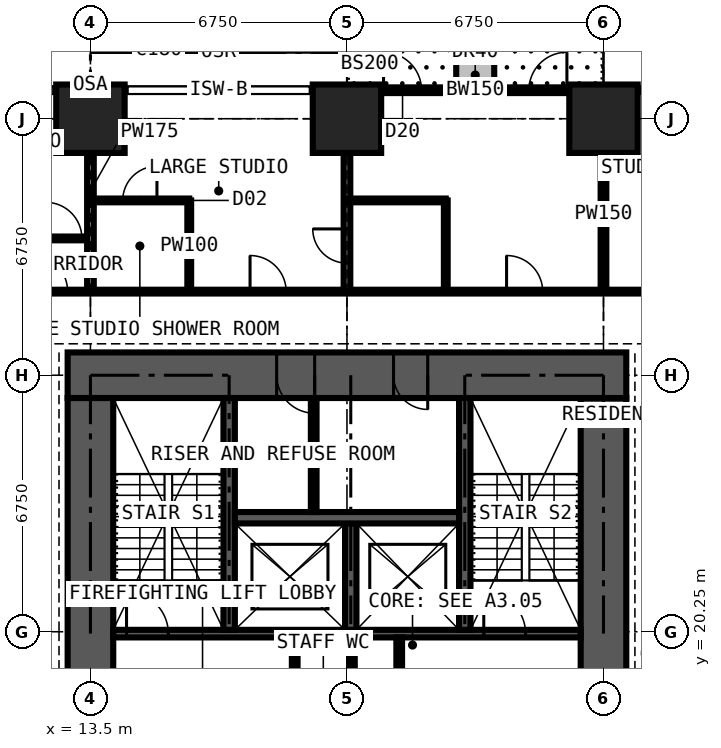
"""IFC4 building model, lengths in metres.
Left out: names, types, materials, properties, quantities, classifications, styles, units other than length and angle.
Written with IfcOpenShell. Run it as: python <this file> out.ifc"""

import sys

from ifc_helpers import new_model, si_unit, direction, frame, frame_2d, origin, origin_2d, place, context, subcontext, project, spatial, rectangle, extrude, element, fill, save


model = new_model("IFC4")
c1 = context("Model", 3, precision=1e-05, world=origin(), true_north=direction((0.0, 1.0)))
c2 = subcontext(c1, "Body", "Model", "MODEL_VIEW")
j1 = project(units=[si_unit("LENGTHUNIT", "METRE"), si_unit("PLANEANGLEUNIT", "RADIAN")], contexts=[c1])
p1 = place(None, origin())
s1 = spatial("IfcSite", under=j1, at=p1, CompositionType="ELEMENT")
p2 = place(p1, origin())
s2 = spatial("IfcBuilding", under=s1, at=p2, CompositionType="ELEMENT")
p3 = place(p2, frame((0.0, 0.0, 105.3)))
s3 = spatial("IfcBuildingStorey", under=s2, at=p3, CompositionType="ELEMENT", Elevation=105.3)
for number, where, z_axis, x_axis in (
    (1, (13.5, 33.75, 0.0), (0.0, 0.0, 1.0), (1.0, 0.0, 0.0)),
    (2, (20.25, 33.75, 0.0), (0.0, 0.0, 1.0), (1.0, 0.0, 0.0)),
    (3, (27.0, 33.75, 0.0), (0.0, 0.0, 1.0), (1.0, 0.0, 0.0)),
):
    element("IfcColumn", number, at=place(p3, frame(where, z_axis=z_axis, x_axis=x_axis)), inside=s3, PredefinedType="COLUMN", context=c2, shape_type="SweptSolid", body=[
        extrude(rectangle(XDim=1.8, YDim=1.8, at=origin_2d()), origin(), (0.0, 0.0, 1.0), 3.6),
    ])
p4 = place(p3, frame((27.0, 14.1, 0.0), z_axis=(0.0, 0.0, 1.0), x_axis=(0.0, 1.0, 0.0)))
e4 = element("IfcWall", 4, at=p4, inside=s3, PredefinedType="SHEAR", context=c2, shape_type="SweptSolid", body=[
    extrude(rectangle(XDim=12.3, YDim=1.2, at=frame_2d((6.15, 0.0))), origin(), (0.0, 0.0, 1.0), 3.6),
])
p5 = place(p4, frame((3.65, 0.0, 0.0)))
e5 = element("IfcOpeningElement", 5, at=p5, cuts=e4, PredefinedType="OPENING", context=c2, shape_type="SweptSolid", body=[
    extrude(rectangle(XDim=1.2, YDim=2.2, at=frame_2d((0.6, 1.1))), frame((0.0, 0.61, 0.0), z_axis=(0.0, -1.0, 0.0), x_axis=(1.0, 0.0, 0.0)), (0.0, 0.0, 1.0), 1.22),
])
p6 = place(p3, frame((27.6, 27.0, 0.0), z_axis=(0.0, 0.0, 1.0), x_axis=(-1.0, 0.0, 0.0)))
e6 = element("IfcWall", 6, at=p6, inside=s3, PredefinedType="SHEAR", context=c2, shape_type="SweptSolid", body=[
    extrude(rectangle(XDim=14.7, YDim=1.2, at=frame_2d((7.35, 0.0))), origin(), (0.0, 0.0, 1.0), 3.6),
])
p7 = place(p6, frame((5.225, 0.0, 0.0)))
e7 = element("IfcOpeningElement", 7, at=p7, cuts=e6, PredefinedType="OPENING", context=c2, shape_type="SweptSolid", body=[
    extrude(rectangle(XDim=0.9, YDim=2.2, at=frame_2d((0.45, 1.1))), frame((0.0, 0.61, 0.0), z_axis=(0.0, -1.0, 0.0), x_axis=(1.0, 0.0, 0.0)), (0.0, 0.0, 1.0), 1.22),
])
p8 = place(p6, frame((8.2, 0.0, 0.0)))
e8 = element("IfcOpeningElement", 8, at=p8, cuts=e6, PredefinedType="OPENING", context=c2, shape_type="SweptSolid", body=[
    extrude(rectangle(XDim=1.0, YDim=2.2, at=frame_2d((0.5, 1.1))), frame((0.0, 0.61, 0.0), z_axis=(0.0, -1.0, 0.0), x_axis=(1.0, 0.0, 0.0)), (0.0, 0.0, 1.0), 1.22),
])
p9 = place(p3, frame((13.5, 26.4, 0.0), z_axis=(0.0, 0.0, 1.0), x_axis=(0.0, -1.0, 0.0)))
e9 = element("IfcWall", 9, at=p9, inside=s3, PredefinedType="SHEAR", context=c2, shape_type="SweptSolid", body=[
    extrude(rectangle(XDim=12.3, YDim=1.2, at=frame_2d((6.15, 0.0))), origin(), (0.0, 0.0, 1.0), 3.6),
])
p10 = place(p9, frame((7.45, 0.0, 0.0)))
e10 = element("IfcOpeningElement", 10, at=p10, cuts=e9, PredefinedType="OPENING", context=c2, shape_type="SweptSolid", body=[
    extrude(rectangle(XDim=1.2, YDim=2.2, at=frame_2d((0.6, 1.1))), frame((0.0, 0.61, 0.0), z_axis=(0.0, -1.0, 0.0), x_axis=(1.0, 0.0, 0.0)), (0.0, 0.0, 1.0), 1.22),
])
p11 = place(p3, frame((20.25, 34.5, 0.0), z_axis=(0.0, 0.0, 1.0), x_axis=(1.0, 0.0, 0.0)))
e11 = element("IfcWall", 11, at=p11, inside=s3, PredefinedType="SOLIDWALL", context=c2, shape_type="SweptSolid", body=[
    extrude(rectangle(XDim=6.75, YDim=0.15, at=frame_2d((3.375, 0.0))), origin(), (0.0, 0.0, 1.0), 3.375),
])
p12 = place(p11, frame((0.962, 0.0, 0.0)))
e12 = element("IfcOpeningElement", 12, at=p12, cuts=e11, PredefinedType="OPENING", context=c2, shape_type="SweptSolid", body=[
    extrude(rectangle(XDim=1.0, YDim=2.2, at=frame_2d((0.5, 1.1))), frame((0.0, 0.085, 0.0), z_axis=(0.0, -1.0, 0.0), x_axis=(1.0, 0.0, 0.0)), (0.0, 0.0, 1.0), 0.17),
])
p13 = place(p11, frame((2.025, 0.0, 0.9)))
e13 = element("IfcOpeningElement", 13, at=p13, cuts=e11, PredefinedType="OPENING", context=c2, shape_type="SweptSolid", body=[
    extrude(rectangle(XDim=1.2, YDim=1.8, at=frame_2d((0.6, 0.9))), frame((0.0, 0.085, 0.0), z_axis=(0.0, -1.0, 0.0), x_axis=(1.0, 0.0, 0.0)), (0.0, 0.0, 1.0), 0.17),
])
p14 = place(p11, frame((4.788, 0.0, 0.0)))
e14 = element("IfcOpeningElement", 14, at=p14, cuts=e11, PredefinedType="OPENING", context=c2, shape_type="SweptSolid", body=[
    extrude(rectangle(XDim=1.0, YDim=2.2, at=frame_2d((0.5, 1.1))), frame((0.0, 0.085, 0.0), z_axis=(0.0, -1.0, 0.0), x_axis=(1.0, 0.0, 0.0)), (0.0, 0.0, 1.0), 0.17),
])
p15 = place(p11, frame((3.525, 0.0, 0.9)))
e15 = element("IfcOpeningElement", 15, at=p15, cuts=e11, PredefinedType="OPENING", context=c2, shape_type="SweptSolid", body=[
    extrude(rectangle(XDim=1.2, YDim=1.8, at=frame_2d((0.6, 0.9))), frame((0.0, 0.085, 0.0), z_axis=(0.0, -1.0, 0.0), x_axis=(1.0, 0.0, 0.0)), (0.0, 0.0, 1.0), 0.17),
])
p16 = place(p3, frame((23.625, 34.6, 0.0), z_axis=(0.0, 0.0, 1.0), x_axis=(0.0, 1.0, 0.0)))
e16 = element("IfcWall", 16, at=p16, inside=s3, PredefinedType="USERDEFINED", context=c2, shape_type="SweptSolid", body=[
    extrude(rectangle(XDim=2.2, YDim=1.0, at=frame_2d((1.1, 0.0))), origin(), (0.0, 0.0, 1.0), 0.9),
])
p17 = place(p3, frame((14.1, 20.2, 0.0), z_axis=(0.0, 0.0, 1.0), x_axis=(1.0, 0.0, 0.0)))
e17 = element("IfcWall", 17, at=p17, inside=s3, PredefinedType="SHEAR", context=c2, shape_type="SweptSolid", body=[
    extrude(rectangle(XDim=12.3, YDim=0.2, at=frame_2d((6.15, 0.0))), origin(), (0.0, 0.0, 1.0), 3.6),
])
p18 = place(p17, frame((0.35, 0.0, 0.0)))
e18 = element("IfcOpeningElement", 18, at=p18, cuts=e17, PredefinedType="OPENING", context=c2, shape_type="SweptSolid", body=[
    extrude(rectangle(XDim=1.1, YDim=2.2, at=frame_2d((0.55, 1.1))), frame((0.0, 0.11, 0.0), z_axis=(0.0, -1.0, 0.0), x_axis=(1.0, 0.0, 0.0)), (0.0, 0.0, 1.0), 0.22),
])
p19 = place(p17, frame((9.75, 0.0, 0.0)))
e19 = element("IfcOpeningElement", 19, at=p19, cuts=e17, PredefinedType="OPENING", context=c2, shape_type="SweptSolid", body=[
    extrude(rectangle(XDim=1.1, YDim=2.2, at=frame_2d((0.55, 1.1))), frame((0.0, 0.11, 0.0), z_axis=(0.0, -1.0, 0.0), x_axis=(1.0, 0.0, 0.0)), (0.0, 0.0, 1.0), 0.22),
])
for number, where, z_axis, x_axis in (
    (20, (17.15, 20.3, 0.0), (0.0, 0.0, 1.0), (0.0, 1.0, 0.0)),
    (21, (23.35, 20.3, 0.0), (0.0, 0.0, 1.0), (0.0, 1.0, 0.0)),
):
    element("IfcWall", number, at=place(p3, frame(where, z_axis=z_axis, x_axis=x_axis)), inside=s3, PredefinedType="SHEAR", context=c2, shape_type="SweptSolid", body=[
        extrude(rectangle(XDim=6.1, YDim=0.3, at=frame_2d((3.05, 0.0))), origin(), (0.0, 0.0, 1.0), 3.6),
    ])
p20 = place(p3, frame((20.35, 20.3, 0.0), z_axis=(0.0, 0.0, 1.0), x_axis=(0.0, 1.0, 0.0)))
e22 = element("IfcWall", 22, at=p20, inside=s3, PredefinedType="SHEAR", context=c2, shape_type="SweptSolid", body=[
    extrude(rectangle(XDim=2.8, YDim=0.3, at=frame_2d((1.4, 0.0))), origin(), (0.0, 0.0, 1.0), 3.6),
])
p21 = place(p3, frame((17.3, 23.25, 0.0), z_axis=(0.0, 0.0, 1.0), x_axis=(1.0, 0.0, 0.0)))
e23 = element("IfcWall", 23, at=p21, inside=s3, PredefinedType="SHEAR", context=c2, shape_type="SweptSolid", body=[
    extrude(rectangle(XDim=5.9, YDim=0.3, at=frame_2d((2.95, 0.0))), origin(), (0.0, 0.0, 1.0), 3.6),
])
p22 = place(p3, frame((18.875, 16.6, 0.0), z_axis=(0.0, 0.0, 1.0), x_axis=(0.0, 1.0, 0.0)))
e24 = element("IfcWall", 24, at=p22, inside=s3, PredefinedType="PARTITIONING", context=c2, shape_type="SweptSolid", body=[
    extrude(rectangle(XDim=3.5, YDim=0.15, at=frame_2d((1.75, 0.0))), origin(), (0.0, 0.0, 1.0), 3.375),
])
p23 = place(p22, frame((1.15, 0.0, 0.0)))
e25 = element("IfcOpeningElement", 25, at=p23, cuts=e24, PredefinedType="OPENING", context=c2, shape_type="SweptSolid", body=[
    extrude(rectangle(XDim=1.2, YDim=2.2, at=frame_2d((0.6, 1.1))), frame((0.0, 0.085, 0.0), z_axis=(0.0, -1.0, 0.0), x_axis=(1.0, 0.0, 0.0)), (0.0, 0.0, 1.0), 0.17),
])
p24 = place(p3, frame((21.625, 16.6, 0.0), z_axis=(0.0, 0.0, 1.0), x_axis=(0.0, 1.0, 0.0)))
e26 = element("IfcWall", 26, at=p24, inside=s3, PredefinedType="PARTITIONING", context=c2, shape_type="SweptSolid", body=[
    extrude(rectangle(XDim=3.5, YDim=0.15, at=frame_2d((1.75, 0.0))), origin(), (0.0, 0.0, 1.0), 3.375),
])
p25 = place(p24, frame((1.15, 0.0, 0.0)))
e27 = element("IfcOpeningElement", 27, at=p25, cuts=e26, PredefinedType="OPENING", context=c2, shape_type="SweptSolid", body=[
    extrude(rectangle(XDim=1.2, YDim=2.2, at=frame_2d((0.6, 1.1))), frame((0.0, 0.085, 0.0), z_axis=(0.0, -1.0, 0.0), x_axis=(1.0, 0.0, 0.0)), (0.0, 0.0, 1.0), 0.17),
])
p26 = place(p3, frame((20.38, 16.6, 0.0), z_axis=(0.0, 0.0, 1.0), x_axis=(0.0, 1.0, 0.0)))
e28 = element("IfcWall", 28, at=p26, inside=s3, PredefinedType="PARTITIONING", context=c2, shape_type="SweptSolid", body=[
    extrude(rectangle(XDim=3.5, YDim=0.15, at=frame_2d((1.75, 0.0))), origin(), (0.0, 0.0, 1.0), 3.375),
])
p27 = place(p3, frame((19.375, 23.4, 0.0), z_axis=(0.0, 0.0, 1.0), x_axis=(0.0, 1.0, 0.0)))
e29 = element("IfcWall", 29, at=p27, inside=s3, PredefinedType="PARTITIONING", context=c2, shape_type="SweptSolid", body=[
    extrude(rectangle(XDim=3.0, YDim=0.15, at=frame_2d((1.5, 0.0))), origin(), (0.0, 0.0, 1.0), 3.375),
])
p28 = place(p3, frame((10.125, 30.6, 0.0), z_axis=(0.0, 0.0, 1.0), x_axis=(1.0, 0.0, 0.0)))
e30 = element("IfcWall", 30, at=p28, inside=s3, PredefinedType="PARTITIONING", context=c2, shape_type="SweptSolid", body=[
    extrude(rectangle(XDim=3.375, YDim=0.1, at=frame_2d((1.688, 0.0))), origin(), (0.0, 0.0, 1.0), 3.375),
])
p29 = place(p28, frame((2.2, 0.0, 0.0)))
e31 = element("IfcOpeningElement", 31, at=p29, cuts=e30, PredefinedType="OPENING", context=c2, shape_type="SweptSolid", body=[
    extrude(rectangle(XDim=0.95, YDim=2.2, at=frame_2d((0.475, 1.1))), frame((0.0, 0.06, 0.0), z_axis=(0.0, -1.0, 0.0), x_axis=(1.0, 0.0, 0.0)), (0.0, 0.0, 1.0), 0.12),
])
p30 = place(p3, frame((11.3, 29.2, 0.0), z_axis=(0.0, 0.0, 1.0), x_axis=(1.0, 0.0, 0.0)))
e32 = element("IfcWall", 32, at=p30, inside=s3, PredefinedType="PARTITIONING", context=c2, shape_type="SweptSolid", body=[
    extrude(rectangle(XDim=19.075, YDim=0.1, at=frame_2d((9.538, 0.0))), origin(), (0.0, 0.0, 1.0), 3.375),
])
p31 = place(p30, frame((6.4, 0.0, 0.0)))
e33 = element("IfcOpeningElement", 33, at=p31, cuts=e32, PredefinedType="OPENING", context=c2, shape_type="SweptSolid", body=[
    extrude(rectangle(XDim=0.95, YDim=2.2, at=frame_2d((0.475, 1.1))), frame((0.0, 0.06, 0.0), z_axis=(0.0, -1.0, 0.0), x_axis=(1.0, 0.0, 0.0)), (0.0, 0.0, 1.0), 0.12),
])
p32 = place(p30, frame((13.15, 0.0, 0.0)))
e34 = element("IfcOpeningElement", 34, at=p32, cuts=e32, PredefinedType="OPENING", context=c2, shape_type="SweptSolid", body=[
    extrude(rectangle(XDim=0.95, YDim=2.2, at=frame_2d((0.475, 1.1))), frame((0.0, 0.06, 0.0), z_axis=(0.0, -1.0, 0.0), x_axis=(1.0, 0.0, 0.0)), (0.0, 0.0, 1.0), 0.12),
])
p33 = place(p30, frame((0.6, 0.0, 0.0)))
e35 = element("IfcOpeningElement", 35, at=p33, cuts=e32, PredefinedType="OPENING", context=c2, shape_type="SweptSolid", body=[
    extrude(rectangle(XDim=1.0, YDim=2.2, at=frame_2d((0.5, 1.1))), frame((0.0, 0.06, 0.0), z_axis=(0.0, -1.0, 0.0), x_axis=(1.0, 0.0, 0.0)), (0.0, 0.0, 1.0), 0.12),
])
p34 = place(p3, frame((13.5, 29.2, 0.0), z_axis=(0.0, 0.0, 1.0), x_axis=(0.0, 1.0, 0.0)))
e36 = element("IfcWall", 36, at=p34, inside=s3, PredefinedType="PARTITIONING", context=c2, shape_type="SweptSolid", body=[
    extrude(rectangle(XDim=5.284, YDim=0.175, at=frame_2d((2.642, 0.0))), origin(), (0.0, 0.0, 1.0), 2.61),
])
p35 = place(p3, frame((13.5, 31.6, 0.0), z_axis=(0.0, 0.0, 1.0), x_axis=(1.0, 0.0, 0.0)))
e37 = element("IfcWall", 37, at=p35, inside=s3, PredefinedType="PARTITIONING", context=c2, shape_type="SweptSolid", body=[
    extrude(rectangle(XDim=2.6, YDim=0.1, at=frame_2d((1.3, 0.0))), origin(), (0.0, 0.0, 1.0), 3.375),
])
p36 = place(p35, frame((0.85, 0.0, 0.0)))
e38 = element("IfcOpeningElement", 38, at=p36, cuts=e37, PredefinedType="OPENING", context=c2, shape_type="SweptSolid", body=[
    extrude(rectangle(XDim=0.9, YDim=2.2, at=frame_2d((0.45, 1.1))), frame((0.0, 0.06, 0.0), z_axis=(0.0, -1.0, 0.0), x_axis=(1.0, 0.0, 0.0)), (0.0, 0.0, 1.0), 0.12),
])
p37 = place(p3, frame((16.1, 29.2, 0.0), z_axis=(0.0, 0.0, 1.0), x_axis=(0.0, 1.0, 0.0)))
e39 = element("IfcWall", 39, at=p37, inside=s3, PredefinedType="PARTITIONING", context=c2, shape_type="SweptSolid", body=[
    extrude(rectangle(XDim=2.4, YDim=0.1, at=frame_2d((1.2, 0.0))), origin(), (0.0, 0.0, 1.0), 3.375),
])
p38 = place(p3, frame((20.25, 29.2, 0.0), z_axis=(0.0, 0.0, 1.0), x_axis=(0.0, 1.0, 0.0)))
e40 = element("IfcWall", 40, at=p38, inside=s3, PredefinedType="PARTITIONING", context=c2, shape_type="SweptSolid", body=[
    extrude(rectangle(XDim=5.284, YDim=0.175, at=frame_2d((2.642, 0.0))), origin(), (0.0, 0.0, 1.0), 2.61),
])
p39 = place(p38, frame((0.75, 0.0, 0.0)))
e41 = element("IfcOpeningElement", 41, at=p39, cuts=e40, PredefinedType="OPENING", context=c2, shape_type="SweptSolid", body=[
    extrude(rectangle(XDim=0.9, YDim=2.2, at=frame_2d((0.45, 1.1))), frame((0.0, 0.097, 0.0), z_axis=(0.0, -1.0, 0.0), x_axis=(1.0, 0.0, 0.0)), (0.0, 0.0, 1.0), 0.195),
])
p40 = place(p3, frame((20.25, 31.6, 0.0), z_axis=(0.0, 0.0, 1.0), x_axis=(1.0, 0.0, 0.0)))
e42 = element("IfcWall", 42, at=p40, inside=s3, PredefinedType="PARTITIONING", context=c2, shape_type="SweptSolid", body=[
    extrude(rectangle(XDim=2.6, YDim=0.1, at=frame_2d((1.3, 0.0))), origin(), (0.0, 0.0, 1.0), 3.375),
])
p41 = place(p3, frame((22.85, 29.2, 0.0), z_axis=(0.0, 0.0, 1.0), x_axis=(0.0, 1.0, 0.0)))
e43 = element("IfcWall", 43, at=p41, inside=s3, PredefinedType="PARTITIONING", context=c2, shape_type="SweptSolid", body=[
    extrude(rectangle(XDim=2.4, YDim=0.1, at=frame_2d((1.2, 0.0))), origin(), (0.0, 0.0, 1.0), 3.375),
])
p42 = place(p3, frame((27.0, 29.2, 0.0), z_axis=(0.0, 0.0, 1.0), x_axis=(0.0, 1.0, 0.0)))
e44 = element("IfcWall", 44, at=p42, inside=s3, PredefinedType="PARTITIONING", context=c2, shape_type="SweptSolid", body=[
    extrude(rectangle(XDim=5.284, YDim=0.15, at=frame_2d((2.642, 0.0))), origin(), (0.0, 0.0, 1.0), 2.61),
])
p43 = place(p12, origin())
e45 = element("IfcDoor", 45, at=p43, inside=s3, OperationType="SINGLE_SWING_LEFT", PredefinedType="DOOR", context=c2, shape_type="SweptSolid", body=[
    extrude(rectangle(XDim=1.0, YDim=2.2, at=frame_2d((0.5, 1.1))), frame((0.0, 0.025, 0.0), z_axis=(0.0, -1.0, 0.0), x_axis=(1.0, 0.0, 0.0)), (0.0, 0.0, 1.0), 0.05),
])
fill(e12, e45)
p44 = place(p13, origin())
e46 = element("IfcWindow", 46, at=p44, inside=s3, PartitioningType="SINGLE_PANEL", PredefinedType="WINDOW", context=c2, shape_type="SweptSolid", body=[
    extrude(rectangle(XDim=1.2, YDim=1.8, at=frame_2d((0.6, 0.9))), frame((0.0, 0.03, 0.0), z_axis=(0.0, -1.0, 0.0), x_axis=(1.0, 0.0, 0.0)), (0.0, 0.0, 1.0), 0.06),
])
fill(e13, e46)
p45 = place(p14, origin())
e47 = element("IfcDoor", 47, at=p45, inside=s3, OperationType="SINGLE_SWING_RIGHT", PredefinedType="DOOR", context=c2, shape_type="SweptSolid", body=[
    extrude(rectangle(XDim=1.0, YDim=2.2, at=frame_2d((0.5, 1.1))), frame((0.0, 0.025, 0.0), z_axis=(0.0, -1.0, 0.0), x_axis=(1.0, 0.0, 0.0)), (0.0, 0.0, 1.0), 0.05),
])
fill(e14, e47)
p46 = place(p15, origin())
e48 = element("IfcWindow", 48, at=p46, inside=s3, PartitioningType="SINGLE_PANEL", PredefinedType="WINDOW", context=c2, shape_type="SweptSolid", body=[
    extrude(rectangle(XDim=1.2, YDim=1.8, at=frame_2d((0.6, 0.9))), frame((0.0, 0.03, 0.0), z_axis=(0.0, -1.0, 0.0), x_axis=(1.0, 0.0, 0.0)), (0.0, 0.0, 1.0), 0.06),
])
fill(e15, e48)
p47 = place(p7, origin())
e49 = element("IfcDoor", 49, at=p47, inside=s3, OperationType="SINGLE_SWING_LEFT", PredefinedType="DOOR", context=c2, shape_type="SweptSolid", body=[
    extrude(rectangle(XDim=0.9, YDim=2.2, at=frame_2d((0.45, 1.1))), frame((0.0, 0.4, 0.0), z_axis=(0.0, -1.0, 0.0), x_axis=(1.0, 0.0, 0.0)), (0.0, 0.0, 1.0), 0.8),
])
fill(e7, e49)
p48 = place(p8, origin())
e50 = element("IfcDoor", 50, at=p48, inside=s3, OperationType="SINGLE_SWING_LEFT", PredefinedType="DOOR", context=c2, shape_type="SweptSolid", body=[
    extrude(rectangle(XDim=1.0, YDim=2.2, at=frame_2d((0.5, 1.1))), frame((0.0, 0.025, 0.0), z_axis=(0.0, -1.0, 0.0), x_axis=(1.0, 0.0, 0.0)), (0.0, 0.0, 1.0), 0.05),
])
fill(e8, e50)
p49 = place(p18, origin())
e51 = element("IfcDoor", 51, at=p49, inside=s3, OperationType="SINGLE_SWING_LEFT", PredefinedType="DOOR", context=c2, shape_type="SweptSolid", body=[
    extrude(rectangle(XDim=1.1, YDim=2.2, at=frame_2d((0.55, 1.1))), frame((0.0, 0.025, 0.0), z_axis=(0.0, -1.0, 0.0), x_axis=(1.0, 0.0, 0.0)), (0.0, 0.0, 1.0), 0.05),
])
fill(e18, e51)
p50 = place(p19, origin())
e52 = element("IfcDoor", 52, at=p50, inside=s3, OperationType="SINGLE_SWING_LEFT", PredefinedType="DOOR", context=c2, shape_type="SweptSolid", body=[
    extrude(rectangle(XDim=1.1, YDim=2.2, at=frame_2d((0.55, 1.1))), frame((0.0, 0.025, 0.0), z_axis=(0.0, -1.0, 0.0), x_axis=(1.0, 0.0, 0.0)), (0.0, 0.0, 1.0), 0.05),
])
fill(e19, e52)
p51 = place(p31, origin())
e53 = element("IfcDoor", 53, at=p51, inside=s3, OperationType="SINGLE_SWING_LEFT", PredefinedType="DOOR", context=c2, shape_type="SweptSolid", body=[
    extrude(rectangle(XDim=0.95, YDim=2.2, at=frame_2d((0.475, 1.1))), frame((0.0, 0.025, 0.0), z_axis=(0.0, -1.0, 0.0), x_axis=(1.0, 0.0, 0.0)), (0.0, 0.0, 1.0), 0.05),
])
fill(e33, e53)
p52 = place(p36, origin())
e54 = element("IfcDoor", 54, at=p52, inside=s3, OperationType="SINGLE_SWING_RIGHT", PredefinedType="DOOR", context=c2, shape_type="SweptSolid", body=[
    extrude(rectangle(XDim=0.9, YDim=2.2, at=frame_2d((0.45, 1.1))), frame((0.0, 0.025, 0.0), z_axis=(0.0, -1.0, 0.0), x_axis=(1.0, 0.0, 0.0)), (0.0, 0.0, 1.0), 0.05),
])
fill(e38, e54)
p53 = place(p32, origin())
e55 = element("IfcDoor", 55, at=p53, inside=s3, OperationType="SINGLE_SWING_LEFT", PredefinedType="DOOR", context=c2, shape_type="SweptSolid", body=[
    extrude(rectangle(XDim=0.95, YDim=2.2, at=frame_2d((0.475, 1.1))), frame((0.0, 0.025, 0.0), z_axis=(0.0, -1.0, 0.0), x_axis=(1.0, 0.0, 0.0)), (0.0, 0.0, 1.0), 0.05),
])
fill(e34, e55)
p54 = place(p39, origin())
e56 = element("IfcDoor", 56, at=p54, inside=s3, OperationType="SINGLE_SWING_RIGHT", PredefinedType="DOOR", context=c2, shape_type="SweptSolid", body=[
    extrude(rectangle(XDim=0.9, YDim=2.2, at=frame_2d((0.45, 1.1))), frame((0.0, 0.025, 0.0), z_axis=(0.0, -1.0, 0.0), x_axis=(1.0, 0.0, 0.0)), (0.0, 0.0, 1.0), 0.05),
])
fill(e41, e56)
p55 = place(p29, origin())
e57 = element("IfcDoor", 57, at=p55, inside=s3, OperationType="SINGLE_SWING_LEFT", PredefinedType="DOOR", context=c2, shape_type="SweptSolid", body=[
    extrude(rectangle(XDim=0.95, YDim=2.2, at=frame_2d((0.475, 1.1))), frame((0.0, 0.025, 0.0), z_axis=(0.0, -1.0, 0.0), x_axis=(1.0, 0.0, 0.0)), (0.0, 0.0, 1.0), 0.05),
])
fill(e31, e57)
p56 = place(p33, origin())
e58 = element("IfcDoor", 58, at=p56, inside=s3, OperationType="SINGLE_SWING_LEFT", PredefinedType="DOOR", context=c2, shape_type="SweptSolid", body=[
    extrude(rectangle(XDim=1.0, YDim=2.2, at=frame_2d((0.5, 1.1))), frame((0.0, 0.025, 0.0), z_axis=(0.0, -1.0, 0.0), x_axis=(1.0, 0.0, 0.0)), (0.0, 0.0, 1.0), 0.05),
])
fill(e35, e58)
save(model, sys.argv[1])
